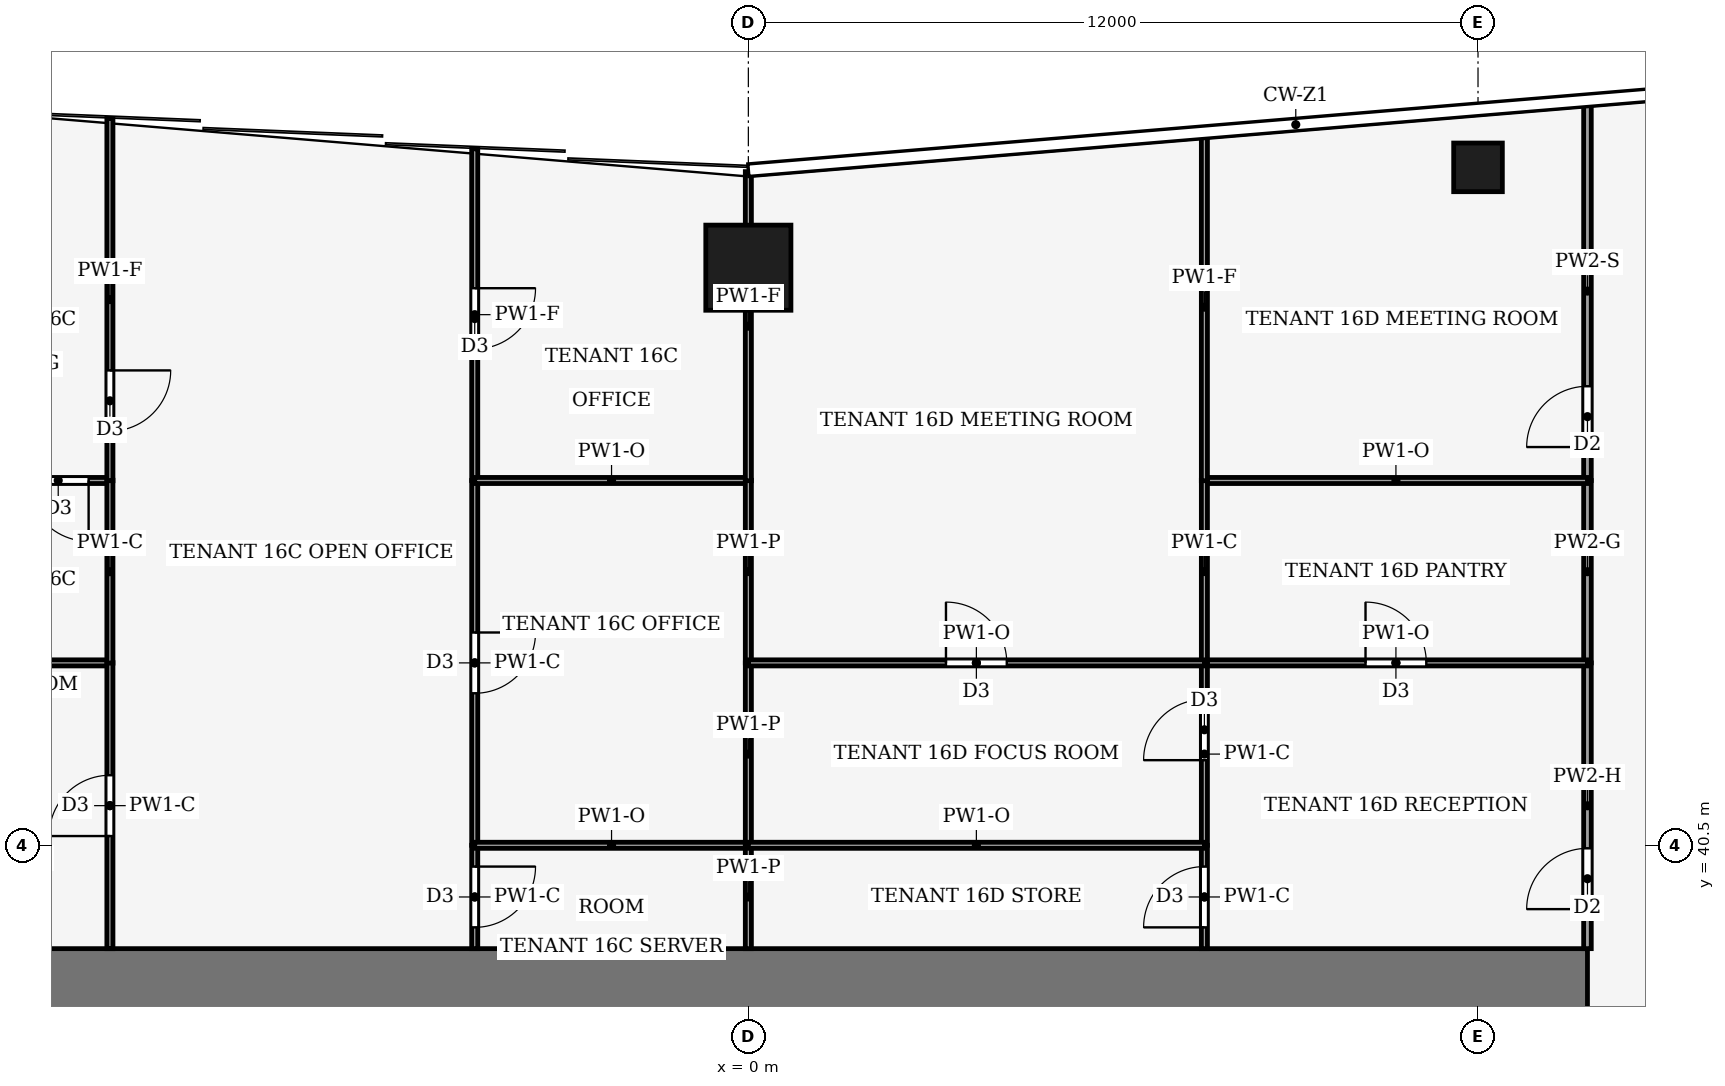
"""IFC4 building model, lengths in metres.
Left out: names, types, materials, properties, quantities, classifications, styles, units other than length and angle.
Written with IfcOpenShell. Run it as: python <this file> out.ifc"""

import sys

from ifc_helpers import new_model, si_unit, direction, frame, frame_2d, origin, origin_2d, place, context, subcontext, project, spatial, rectangle, hollow_rectangle, extrude, element, fill, save


model = new_model("IFC4")
c1 = context("Model", 3, precision=1e-05, world=origin(), true_north=direction((0.0, 1.0)))
c2 = subcontext(c1, "Body", "Model", "MODEL_VIEW")
j1 = project(units=[si_unit("LENGTHUNIT", "METRE"), si_unit("PLANEANGLEUNIT", "RADIAN")], contexts=[c1])
p1 = place(None, origin())
s1 = spatial("IfcSite", under=j1, at=p1, CompositionType="ELEMENT")
p2 = place(p1, origin())
s2 = spatial("IfcBuilding", under=s1, at=p2, CompositionType="ELEMENT")
p3 = place(p2, frame((0.0, 0.0, 74.0)))
s3 = spatial("IfcBuildingStorey", under=s2, at=p3, CompositionType="ELEMENT", Elevation=74.0)
p4 = place(p3, frame((-13.8, 38.2, -0.13), z_axis=(0.0, 0.0, 1.0), x_axis=(1.0, 0.0, 0.0)))
e1 = element("IfcWall", 1, at=p4, inside=s3, PredefinedType="SHEAR", context=c2, shape_type="SweptSolid", body=[
    extrude(rectangle(XDim=27.6, YDim=1.2, at=frame_2d((13.8, 0.0))), origin(), (0.0, 0.0, 1.0), 4.0),
])
p5 = place(p3, frame((0.0, 50.0, 0.0), z_axis=(0.0, 0.0, 1.0), x_axis=(1.0, 0.0, 0.0)))
e2 = element("IfcColumn", 2, at=p5, inside=s3, PredefinedType="COLUMN", context=c2, shape_type="SweptSolid", body=[
    extrude(hollow_rectangle(XDim=1.4, YDim=1.4, WallThickness=0.08, at=origin_2d()), origin(), (0.0, 0.0, 1.0), 4.0),
])
p6 = place(p3, frame((12.0, 51.65, 0.0), z_axis=(0.0, 0.0, 1.0), x_axis=(1.0, 0.0, 0.0)))
e3 = element("IfcColumn", 3, at=p6, inside=s3, PredefinedType="COLUMN", context=c2, shape_type="SweptSolid", body=[
    extrude(hollow_rectangle(XDim=0.8, YDim=0.8, WallThickness=0.04, at=origin_2d()), origin(), (0.0, 0.0, 1.0), 4.0),
])
p7 = place(p3, frame((13.8, 38.8, 0.0), z_axis=(0.0, 0.0, 1.0), x_axis=(0.0, 1.0, 0.0)))
e4 = element("IfcWall", 4, at=p7, inside=s3, PredefinedType="PARTITIONING", context=c2, shape_type="SweptSolid", body=[
    extrude(rectangle(XDim=4.7, YDim=0.125, at=frame_2d((2.35, 0.0))), origin(), (0.0, 0.0, 1.0), 3.14),
])
p8 = place(p7, frame((0.65, 0.0, 0.0)))
e5 = element("IfcOpeningElement", 5, at=p8, cuts=e4, PredefinedType="OPENING", context=c2, shape_type="SweptSolid", body=[
    extrude(rectangle(XDim=1.0, YDim=2.1, at=frame_2d((0.5, 1.05))), frame((0.0, 0.073, 0.0), z_axis=(0.0, -1.0, 0.0), x_axis=(1.0, 0.0, 0.0)), (0.0, 0.0, 1.0), 0.145),
])
p9 = place(p3, frame((13.8, 46.5, 0.0), z_axis=(0.0, 0.0, 1.0), x_axis=(0.0, -1.0, 0.0)))
e6 = element("IfcWall", 6, at=p9, inside=s3, PredefinedType="PARTITIONING", context=c2, shape_type="SweptSolid", body=[
    extrude(rectangle(XDim=3.0, YDim=0.125, at=frame_2d((1.5, 0.0))), origin(), (0.0, 0.0, 1.0), 3.87),
])
p10 = place(p3, frame((13.8, 46.5, 0.0), z_axis=(0.0, 0.0, 1.0), x_axis=(0.0, 1.0, 0.0)))
e7 = element("IfcWall", 7, at=p10, inside=s3, PredefinedType="PARTITIONING", context=c2, shape_type="SweptSolid", body=[
    extrude(rectangle(XDim=6.23, YDim=0.125, at=frame_2d((3.115, 0.0))), origin(), (0.0, 0.0, 1.0), 3.04),
])
p11 = place(p10, frame((0.55, 0.0, 0.0)))
e8 = element("IfcOpeningElement", 8, at=p11, cuts=e7, PredefinedType="OPENING", context=c2, shape_type="SweptSolid", body=[
    extrude(rectangle(XDim=1.0, YDim=2.1, at=frame_2d((0.5, 1.05))), frame((0.0, 0.073, 0.0), z_axis=(0.0, -1.0, 0.0), x_axis=(1.0, 0.0, 0.0)), (0.0, 0.0, 1.0), 0.145),
])
p12 = place(p3, frame((-10.5, 43.5, 0.0), z_axis=(0.0, 0.0, 1.0), x_axis=(-1.0, 0.0, 0.0)))
e9 = element("IfcWall", 9, at=p12, inside=s3, PredefinedType="PARTITIONING", context=c2, shape_type="SweptSolid", body=[
    extrude(rectangle(XDim=3.3, YDim=0.1, at=frame_2d((1.65, 0.0))), origin(), (0.0, 0.0, 1.0), 3.39),
])
p13 = place(p3, frame((-10.5, 38.8, 0.0), z_axis=(0.0, 0.0, 1.0), x_axis=(0.0, 1.0, 0.0)))
e10 = element("IfcWall", 10, at=p13, inside=s3, PredefinedType="PARTITIONING", context=c2, shape_type="SweptSolid", body=[
    extrude(rectangle(XDim=4.704, YDim=0.1, at=frame_2d((2.352, 0.0))), origin(), (0.0, 0.0, 1.0), 3.87),
])
p14 = place(p13, frame((1.852, 0.0, 0.0)))
e11 = element("IfcOpeningElement", 11, at=p14, cuts=e10, PredefinedType="OPENING", context=c2, shape_type="SweptSolid", body=[
    extrude(rectangle(XDim=1.0, YDim=2.1, at=frame_2d((0.5, 1.05))), frame((0.0, 0.06, 0.0), z_axis=(0.0, -1.0, 0.0), x_axis=(1.0, 0.0, 0.0)), (0.0, 0.0, 1.0), 0.12),
])
p15 = place(p3, frame((-10.5, 46.5, 0.0), z_axis=(0.0, 0.0, 1.0), x_axis=(-1.0, 0.0, 0.0)))
e12 = element("IfcWall", 12, at=p15, inside=s3, PredefinedType="PARTITIONING", context=c2, shape_type="SweptSolid", body=[
    extrude(rectangle(XDim=3.3, YDim=0.1, at=frame_2d((1.65, 0.0))), origin(), (0.0, 0.0, 1.0), 3.39),
])
p16 = place(p15, frame((0.35, 0.0, 0.0)))
e13 = element("IfcOpeningElement", 13, at=p16, cuts=e12, PredefinedType="OPENING", context=c2, shape_type="SweptSolid", body=[
    extrude(rectangle(XDim=1.0, YDim=2.1, at=frame_2d((0.5, 1.05))), frame((0.0, 0.06, 0.0), z_axis=(0.0, -1.0, 0.0), x_axis=(1.0, 0.0, 0.0)), (0.0, 0.0, 1.0), 0.12),
])
p17 = place(p3, frame((-10.5, 43.496, 0.0), z_axis=(0.0, 0.0, 1.0), x_axis=(0.0, 1.0, 0.0)))
e14 = element("IfcWall", 14, at=p17, inside=s3, PredefinedType="PARTITIONING", context=c2, shape_type="SweptSolid", body=[
    extrude(rectangle(XDim=3.008, YDim=0.1, at=frame_2d((1.504, 0.0))), origin(), (0.0, 0.0, 1.0), 3.87),
])
p18 = place(p3, frame((-10.5, 52.455, 0.0), z_axis=(0.0, 0.0, 1.0), x_axis=(0.0, -1.0, 0.0)))
e15 = element("IfcWall", 15, at=p18, inside=s3, PredefinedType="PARTITIONING", context=c2, shape_type="SweptSolid", body=[
    extrude(rectangle(XDim=5.959, YDim=0.1, at=frame_2d((2.979, 0.0))), origin(), (0.0, 0.0, 1.0), 3.04),
])
p19 = place(p18, frame((4.145, 0.0, 0.0)))
e16 = element("IfcOpeningElement", 16, at=p19, cuts=e15, PredefinedType="OPENING", context=c2, shape_type="SweptSolid", body=[
    extrude(rectangle(XDim=1.0, YDim=2.1, at=frame_2d((0.5, 1.05))), frame((0.0, 0.06, 0.0), z_axis=(0.0, -1.0, 0.0), x_axis=(1.0, 0.0, 0.0)), (0.0, 0.0, 1.0), 0.12),
])
p20 = place(p3, frame((-4.5, 40.5, 0.0), z_axis=(0.0, 0.0, 1.0), x_axis=(0.0, -1.0, 0.0)))
e17 = element("IfcWall", 17, at=p20, inside=s3, PredefinedType="PARTITIONING", context=c2, shape_type="SweptSolid", body=[
    extrude(rectangle(XDim=1.7, YDim=0.1, at=frame_2d((0.85, 0.0))), origin(), (0.0, 0.0, 1.0), 3.87),
])
p21 = place(p20, frame((0.35, 0.0, 0.0)))
e18 = element("IfcOpeningElement", 18, at=p21, cuts=e17, PredefinedType="OPENING", context=c2, shape_type="SweptSolid", body=[
    extrude(rectangle(XDim=1.0, YDim=2.1, at=frame_2d((0.5, 1.05))), frame((0.0, 0.06, 0.0), z_axis=(0.0, -1.0, 0.0), x_axis=(1.0, 0.0, 0.0)), (0.0, 0.0, 1.0), 0.12),
])
p22 = place(p3, frame((-4.5, 46.5, 0.0), z_axis=(0.0, 0.0, 1.0), x_axis=(0.0, -1.0, 0.0)))
e19 = element("IfcWall", 19, at=p22, inside=s3, PredefinedType="PARTITIONING", context=c2, shape_type="SweptSolid", body=[
    extrude(rectangle(XDim=6.0, YDim=0.1, at=frame_2d((3.0, 0.0))), origin(), (0.0, 0.0, 1.0), 3.87),
])
p23 = place(p22, frame((2.5, 0.0, 0.0)))
e20 = element("IfcOpeningElement", 20, at=p23, cuts=e19, PredefinedType="OPENING", context=c2, shape_type="SweptSolid", body=[
    extrude(rectangle(XDim=1.0, YDim=2.1, at=frame_2d((0.5, 1.05))), frame((0.0, 0.06, 0.0), z_axis=(0.0, -1.0, 0.0), x_axis=(1.0, 0.0, 0.0)), (0.0, 0.0, 1.0), 0.12),
])
p24 = place(p3, frame((-4.5, 51.955, 0.0), z_axis=(0.0, 0.0, 1.0), x_axis=(0.0, -1.0, 0.0)))
e21 = element("IfcWall", 21, at=p24, inside=s3, PredefinedType="PARTITIONING", context=c2, shape_type="SweptSolid", body=[
    extrude(rectangle(XDim=5.455, YDim=0.1, at=frame_2d((2.728, 0.0))), origin(), (0.0, 0.0, 1.0), 3.04),
])
p25 = place(p24, frame((2.292, 0.0, 0.0)))
e22 = element("IfcOpeningElement", 22, at=p25, cuts=e21, PredefinedType="OPENING", context=c2, shape_type="SweptSolid", body=[
    extrude(rectangle(XDim=1.0, YDim=2.1, at=frame_2d((0.5, 1.05))), frame((0.0, 0.06, 0.0), z_axis=(0.0, -1.0, 0.0), x_axis=(1.0, 0.0, 0.0)), (0.0, 0.0, 1.0), 0.12),
])
p26 = place(p3, frame((0.0, 40.5, 0.0), z_axis=(0.0, 0.0, 1.0), x_axis=(-1.0, 0.0, 0.0)))
e23 = element("IfcWall", 23, at=p26, inside=s3, PredefinedType="PARTITIONING", context=c2, shape_type="SweptSolid", body=[
    extrude(rectangle(XDim=4.5, YDim=0.1, at=frame_2d((2.25, 0.0))), origin(), (0.0, 0.0, 1.0), 3.39),
])
p27 = place(p3, frame((0.0, 38.8, 0.0), z_axis=(0.0, 0.0, 1.0), x_axis=(0.0, 1.0, 0.0)))
e24 = element("IfcWall", 24, at=p27, inside=s3, PredefinedType="PARTITIONING", context=c2, shape_type="SweptSolid", body=[
    extrude(rectangle(XDim=1.7, YDim=0.1, at=frame_2d((0.85, 0.0))), origin(), (0.0, 0.0, 1.0), 3.44),
])
p28 = place(p3, frame((0.0, 46.5, 0.0), z_axis=(0.0, 0.0, 1.0), x_axis=(-1.0, 0.0, 0.0)))
e25 = element("IfcWall", 25, at=p28, inside=s3, PredefinedType="PARTITIONING", context=c2, shape_type="SweptSolid", body=[
    extrude(rectangle(XDim=4.5, YDim=0.1, at=frame_2d((2.25, 0.0))), origin(), (0.0, 0.0, 1.0), 3.39),
])
p29 = place(p3, frame((0.0, 40.5, 0.0), z_axis=(0.0, 0.0, 1.0), x_axis=(0.0, 1.0, 0.0)))
e26 = element("IfcWall", 26, at=p29, inside=s3, PredefinedType="PARTITIONING", context=c2, shape_type="SweptSolid", body=[
    extrude(rectangle(XDim=3.0, YDim=0.1, at=frame_2d((1.5, 0.0))), origin(), (0.0, 0.0, 1.0), 3.44),
])
p30 = place(p3, frame((0.0, 43.5, 0.0), z_axis=(0.0, 0.0, 1.0), x_axis=(0.0, 1.0, 0.0)))
e27 = element("IfcWall", 27, at=p30, inside=s3, PredefinedType="PARTITIONING", context=c2, shape_type="SweptSolid", body=[
    extrude(rectangle(XDim=3.004, YDim=0.1, at=frame_2d((1.502, 0.0))), origin(), (0.0, 0.0, 1.0), 3.44),
])
p31 = place(p3, frame((0.0, 46.496, 0.0), z_axis=(0.0, 0.0, 1.0), x_axis=(0.0, 1.0, 0.0)))
e28 = element("IfcWall", 28, at=p31, inside=s3, PredefinedType="PARTITIONING", context=c2, shape_type="SweptSolid", body=[
    extrude(rectangle(XDim=5.084, YDim=0.1, at=frame_2d((2.542, 0.0))), origin(), (0.0, 0.0, 1.0), 3.04),
])
p32 = place(p3, frame((7.5, 43.5, 0.0), z_axis=(0.0, 0.0, 1.0), x_axis=(1.0, 0.0, 0.0)))
e29 = element("IfcWall", 29, at=p32, inside=s3, PredefinedType="PARTITIONING", context=c2, shape_type="SweptSolid", body=[
    extrude(rectangle(XDim=6.3, YDim=0.1, at=frame_2d((3.15, 0.0))), origin(), (0.0, 0.0, 1.0), 3.39),
])
p33 = place(p32, frame((2.65, 0.0, 0.0)))
e30 = element("IfcOpeningElement", 30, at=p33, cuts=e29, PredefinedType="OPENING", context=c2, shape_type="SweptSolid", body=[
    extrude(rectangle(XDim=1.0, YDim=2.1, at=frame_2d((0.5, 1.05))), frame((0.0, 0.06, 0.0), z_axis=(0.0, -1.0, 0.0), x_axis=(1.0, 0.0, 0.0)), (0.0, 0.0, 1.0), 0.12),
])
p34 = place(p3, frame((7.5, 38.8, 0.0), z_axis=(0.0, 0.0, 1.0), x_axis=(0.0, 1.0, 0.0)))
e31 = element("IfcWall", 31, at=p34, inside=s3, PredefinedType="PARTITIONING", context=c2, shape_type="SweptSolid", body=[
    extrude(rectangle(XDim=1.7, YDim=0.1, at=frame_2d((0.85, 0.0))), origin(), (0.0, 0.0, 1.0), 3.87),
])
p35 = place(p34, frame((0.35, 0.0, 0.0)))
e32 = element("IfcOpeningElement", 32, at=p35, cuts=e31, PredefinedType="OPENING", context=c2, shape_type="SweptSolid", body=[
    extrude(rectangle(XDim=1.0, YDim=2.1, at=frame_2d((0.5, 1.05))), frame((0.0, 0.06, 0.0), z_axis=(0.0, -1.0, 0.0), x_axis=(1.0, 0.0, 0.0)), (0.0, 0.0, 1.0), 0.12),
])
p36 = place(p3, frame((7.5, 40.5, 0.0), z_axis=(0.0, 0.0, 1.0), x_axis=(0.0, 1.0, 0.0)))
e33 = element("IfcWall", 33, at=p36, inside=s3, PredefinedType="PARTITIONING", context=c2, shape_type="SweptSolid", body=[
    extrude(rectangle(XDim=3.0, YDim=0.1, at=frame_2d((1.5, 0.0))), origin(), (0.0, 0.0, 1.0), 3.87),
])
p37 = place(p36, frame((1.4, 0.0, 0.0)))
e34 = element("IfcOpeningElement", 34, at=p37, cuts=e33, PredefinedType="OPENING", context=c2, shape_type="SweptSolid", body=[
    extrude(rectangle(XDim=1.0, YDim=2.1, at=frame_2d((0.5, 1.05))), frame((0.0, 0.06, 0.0), z_axis=(0.0, -1.0, 0.0), x_axis=(1.0, 0.0, 0.0)), (0.0, 0.0, 1.0), 0.12),
])
p38 = place(p3, frame((13.8, 46.5, 0.0), z_axis=(0.0, 0.0, 1.0), x_axis=(-1.0, 0.0, 0.0)))
e35 = element("IfcWall", 35, at=p38, inside=s3, PredefinedType="PARTITIONING", context=c2, shape_type="SweptSolid", body=[
    extrude(rectangle(XDim=6.3, YDim=0.1, at=frame_2d((3.15, 0.0))), origin(), (0.0, 0.0, 1.0), 3.39),
])
p39 = place(p3, frame((7.5, 46.504, 0.0), z_axis=(0.0, 0.0, 1.0), x_axis=(0.0, -1.0, 0.0)))
e36 = element("IfcWall", 36, at=p39, inside=s3, PredefinedType="PARTITIONING", context=c2, shape_type="SweptSolid", body=[
    extrude(rectangle(XDim=3.004, YDim=0.1, at=frame_2d((1.502, 0.0))), origin(), (0.0, 0.0, 1.0), 3.87),
])
p40 = place(p3, frame((7.5, 52.205, 0.0), z_axis=(0.0, 0.0, 1.0), x_axis=(0.0, -1.0, 0.0)))
e37 = element("IfcWall", 37, at=p40, inside=s3, PredefinedType="PARTITIONING", context=c2, shape_type="SweptSolid", body=[
    extrude(rectangle(XDim=5.709, YDim=0.1, at=frame_2d((2.854, 0.0))), origin(), (0.0, 0.0, 1.0), 3.04),
])
p41 = place(p3, frame((7.5, 40.5, 0.0), z_axis=(0.0, 0.0, 1.0), x_axis=(-1.0, 0.0, 0.0)))
e38 = element("IfcWall", 38, at=p41, inside=s3, PredefinedType="PARTITIONING", context=c2, shape_type="SweptSolid", body=[
    extrude(rectangle(XDim=7.5, YDim=0.1, at=frame_2d((3.75, 0.0))), origin(), (0.0, 0.0, 1.0), 3.39),
])
p42 = place(p3, frame((0.0, 43.5, 0.0), z_axis=(0.0, 0.0, 1.0), x_axis=(1.0, 0.0, 0.0)))
e39 = element("IfcWall", 39, at=p42, inside=s3, PredefinedType="PARTITIONING", context=c2, shape_type="SweptSolid", body=[
    extrude(rectangle(XDim=7.5, YDim=0.1, at=frame_2d((3.75, 0.0))), origin(), (0.0, 0.0, 1.0), 3.39),
])
p43 = place(p42, frame((3.25, 0.0, 0.0)))
e40 = element("IfcOpeningElement", 40, at=p43, cuts=e39, PredefinedType="OPENING", context=c2, shape_type="SweptSolid", body=[
    extrude(rectangle(XDim=1.0, YDim=2.1, at=frame_2d((0.5, 1.05))), frame((0.0, 0.06, 0.0), z_axis=(0.0, -1.0, 0.0), x_axis=(1.0, 0.0, 0.0)), (0.0, 0.0, 1.0), 0.12),
])
p44 = place(p8, origin())
e41 = element("IfcDoor", 41, at=p44, inside=s3, OperationType="SINGLE_SWING_LEFT", PredefinedType="DOOR", context=c2, shape_type="SweptSolid", body=[
    extrude(rectangle(XDim=1.0, YDim=2.1, at=frame_2d((0.5, 1.05))), frame((0.0, 0.025, 0.0), z_axis=(0.0, -1.0, 0.0), x_axis=(1.0, 0.0, 0.0)), (0.0, 0.0, 1.0), 0.05),
])
fill(e5, e41)
p45 = place(p11, origin())
e42 = element("IfcDoor", 42, at=p45, inside=s3, OperationType="SINGLE_SWING_LEFT", PredefinedType="DOOR", context=c2, shape_type="SweptSolid", body=[
    extrude(rectangle(XDim=1.0, YDim=2.1, at=frame_2d((0.5, 1.05))), frame((0.0, 0.025, 0.0), z_axis=(0.0, -1.0, 0.0), x_axis=(1.0, 0.0, 0.0)), (0.0, 0.0, 1.0), 0.05),
])
fill(e8, e42)
p46 = place(p14, origin())
e43 = element("IfcDoor", 43, at=p46, inside=s3, OperationType="SINGLE_SWING_RIGHT", PredefinedType="DOOR", context=c2, shape_type="SweptSolid", body=[
    extrude(rectangle(XDim=1.0, YDim=2.1, at=frame_2d((0.5, 1.05))), frame((0.0, 0.025, 0.0), z_axis=(0.0, -1.0, 0.0), x_axis=(1.0, 0.0, 0.0)), (0.0, 0.0, 1.0), 0.05),
])
fill(e11, e43)
p47 = place(p16, origin())
e44 = element("IfcDoor", 44, at=p47, inside=s3, OperationType="SINGLE_SWING_LEFT", PredefinedType="DOOR", context=c2, shape_type="SweptSolid", body=[
    extrude(rectangle(XDim=1.0, YDim=2.1, at=frame_2d((0.5, 1.05))), frame((0.0, 0.025, 0.0), z_axis=(0.0, -1.0, 0.0), x_axis=(1.0, 0.0, 0.0)), (0.0, 0.0, 1.0), 0.05),
])
fill(e13, e44)
p48 = place(p19, origin())
e45 = element("IfcDoor", 45, at=p48, inside=s3, OperationType="SINGLE_SWING_RIGHT", PredefinedType="DOOR", context=c2, shape_type="SweptSolid", body=[
    extrude(rectangle(XDim=1.0, YDim=2.1, at=frame_2d((0.5, 1.05))), frame((0.0, 0.025, 0.0), z_axis=(0.0, -1.0, 0.0), x_axis=(1.0, 0.0, 0.0)), (0.0, 0.0, 1.0), 0.05),
])
fill(e16, e45)
p49 = place(p21, origin())
e46 = element("IfcDoor", 46, at=p49, inside=s3, OperationType="SINGLE_SWING_LEFT", PredefinedType="DOOR", context=c2, shape_type="SweptSolid", body=[
    extrude(rectangle(XDim=1.0, YDim=2.1, at=frame_2d((0.5, 1.05))), frame((0.0, 0.025, 0.0), z_axis=(0.0, -1.0, 0.0), x_axis=(1.0, 0.0, 0.0)), (0.0, 0.0, 1.0), 0.05),
])
fill(e18, e46)
p50 = place(p23, origin())
e47 = element("IfcDoor", 47, at=p50, inside=s3, OperationType="SINGLE_SWING_RIGHT", PredefinedType="DOOR", context=c2, shape_type="SweptSolid", body=[
    extrude(rectangle(XDim=1.0, YDim=2.1, at=frame_2d((0.5, 1.05))), frame((0.0, 0.025, 0.0), z_axis=(0.0, -1.0, 0.0), x_axis=(1.0, 0.0, 0.0)), (0.0, 0.0, 1.0), 0.05),
])
fill(e20, e47)
p51 = place(p25, origin())
e48 = element("IfcDoor", 48, at=p51, inside=s3, OperationType="SINGLE_SWING_RIGHT", PredefinedType="DOOR", context=c2, shape_type="SweptSolid", body=[
    extrude(rectangle(XDim=1.0, YDim=2.1, at=frame_2d((0.5, 1.05))), frame((0.0, 0.025, 0.0), z_axis=(0.0, -1.0, 0.0), x_axis=(1.0, 0.0, 0.0)), (0.0, 0.0, 1.0), 0.05),
])
fill(e22, e48)
p52 = place(p33, origin())
e49 = element("IfcDoor", 49, at=p52, inside=s3, OperationType="SINGLE_SWING_RIGHT", PredefinedType="DOOR", context=c2, shape_type="SweptSolid", body=[
    extrude(rectangle(XDim=1.0, YDim=2.1, at=frame_2d((0.5, 1.05))), frame((0.0, 0.025, 0.0), z_axis=(0.0, -1.0, 0.0), x_axis=(1.0, 0.0, 0.0)), (0.0, 0.0, 1.0), 0.05),
])
fill(e30, e49)
p53 = place(p35, origin())
e50 = element("IfcDoor", 50, at=p53, inside=s3, OperationType="SINGLE_SWING_LEFT", PredefinedType="DOOR", context=c2, shape_type="SweptSolid", body=[
    extrude(rectangle(XDim=1.0, YDim=2.1, at=frame_2d((0.5, 1.05))), frame((0.0, 0.025, 0.0), z_axis=(0.0, -1.0, 0.0), x_axis=(1.0, 0.0, 0.0)), (0.0, 0.0, 1.0), 0.05),
])
fill(e32, e50)
p54 = place(p37, origin())
e51 = element("IfcDoor", 51, at=p54, inside=s3, OperationType="SINGLE_SWING_RIGHT", PredefinedType="DOOR", context=c2, shape_type="SweptSolid", body=[
    extrude(rectangle(XDim=1.0, YDim=2.1, at=frame_2d((0.5, 1.05))), frame((0.0, 0.025, 0.0), z_axis=(0.0, -1.0, 0.0), x_axis=(1.0, 0.0, 0.0)), (0.0, 0.0, 1.0), 0.05),
])
fill(e34, e51)
p55 = place(p43, origin())
e52 = element("IfcDoor", 52, at=p55, inside=s3, OperationType="SINGLE_SWING_LEFT", PredefinedType="DOOR", context=c2, shape_type="SweptSolid", body=[
    extrude(rectangle(XDim=1.0, YDim=2.1, at=frame_2d((0.5, 1.05))), frame((0.0, 0.025, 0.0), z_axis=(0.0, -1.0, 0.0), x_axis=(1.0, 0.0, 0.0)), (0.0, 0.0, 1.0), 0.05),
])
fill(e40, e52)
save(model, sys.argv[1])
